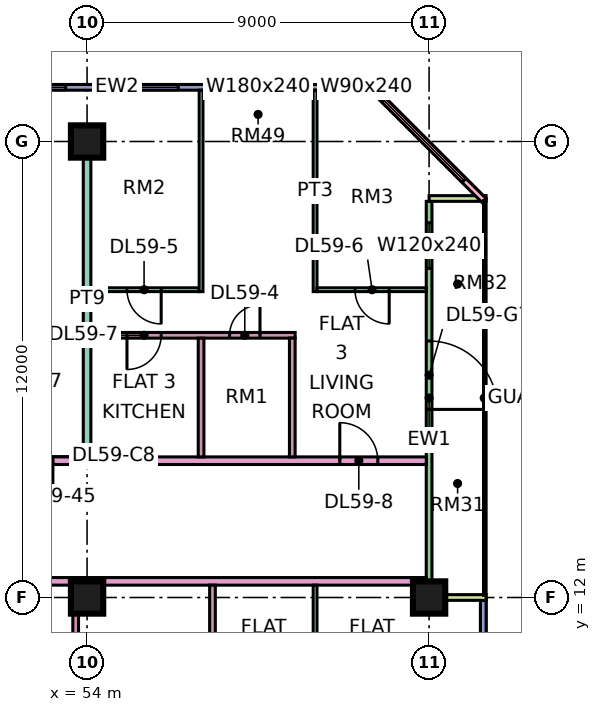
"""IFC4 building model, lengths in metres.
Left out: names, types, materials, properties, quantities, classifications, styles, units other than length and angle.
Written with IfcOpenShell. Run it as: python <this file> out.ifc"""

import sys

from ifc_helpers import new_model, si_unit, direction, frame, frame_2d, origin, origin_2d, place, context, subcontext, project, spatial, rectangle, extrude, element, fill, save


model = new_model("IFC4")
c1 = context("Model", 3, precision=1e-05, world=origin(), true_north=direction((0.0, 1.0)))
c2 = subcontext(c1, "Body", "Model", "MODEL_VIEW")
j1 = project(units=[si_unit("LENGTHUNIT", "METRE"), si_unit("PLANEANGLEUNIT", "RADIAN")], contexts=[c1])
p1 = place(None, origin())
s1 = spatial("IfcSite", under=j1, at=p1, CompositionType="ELEMENT")
p2 = place(p1, origin())
s2 = spatial("IfcBuilding", under=s1, at=p2, CompositionType="ELEMENT")
p3 = place(p2, frame((0.0, 0.0, 249.15)))
s3 = spatial("IfcBuildingStorey", under=s2, at=p3, CompositionType="ELEMENT", Elevation=249.15)
for number, where, z_axis, x_axis in (
    (1, (54.0, 12.0, 0.0), (0.0, 0.0, 1.0), (1.0, 0.0, 0.0)),
    (2, (54.0, 24.0, 0.0), (0.0, 0.0, 1.0), (1.0, 0.0, 0.0)),
    (3, (63.0, 12.0, 0.0), (0.0, 0.0, 1.0), (1.0, 0.0, 0.0)),
):
    element("IfcColumn", number, at=place(p3, frame(where, z_axis=z_axis, x_axis=x_axis)), inside=s3, PredefinedType="COLUMN", context=c2, shape_type="SweptSolid", body=[
        extrude(rectangle(XDim=0.85, YDim=0.85, at=origin_2d()), origin(), (0.0, 0.0, 1.0), 3.75),
    ])
p4 = place(p3, frame((61.5, 25.425, 0.0), z_axis=(0.0, 0.0, 1.0), x_axis=(-1.0, 0.0, 0.0)))
e4 = element("IfcWall", 4, at=p4, inside=s3, PredefinedType="SOLIDWALL", context=c2, shape_type="SweptSolid", body=[
    extrude(rectangle(XDim=13.425, YDim=0.15, at=frame_2d((6.712, 0.0))), origin(), (0.0, 0.0, 1.0), 3.35),
])
p5 = place(p4, frame((0.3, 0.0, 0.45)))
e5 = element("IfcOpeningElement", 5, at=p5, cuts=e4, PredefinedType="OPENING", context=c2, shape_type="SweptSolid", body=[
    extrude(rectangle(XDim=0.9, YDim=2.4, at=frame_2d((0.45, 1.2))), frame((0.0, 0.085, 0.0), z_axis=(0.0, -1.0, 0.0), x_axis=(1.0, 0.0, 0.0)), (0.0, 0.0, 1.0), 0.17),
])
p6 = place(p4, frame((2.1, 0.0, 0.45)))
e6 = element("IfcOpeningElement", 6, at=p6, cuts=e4, PredefinedType="OPENING", context=c2, shape_type="SweptSolid", body=[
    extrude(rectangle(XDim=1.8, YDim=2.4, at=frame_2d((0.9, 1.2))), frame((0.0, 0.085, 0.0), z_axis=(0.0, -1.0, 0.0), x_axis=(1.0, 0.0, 0.0)), (0.0, 0.0, 1.0), 0.17),
])
p7 = place(p4, frame((5.1, 0.0, 0.45)))
e7 = element("IfcOpeningElement", 7, at=p7, cuts=e4, PredefinedType="OPENING", context=c2, shape_type="SweptSolid", body=[
    extrude(rectangle(XDim=1.8, YDim=2.4, at=frame_2d((0.9, 1.2))), frame((0.0, 0.085, 0.0), z_axis=(0.0, -1.0, 0.0), x_axis=(1.0, 0.0, 0.0)), (0.0, 0.0, 1.0), 0.17),
])
p8 = place(p4, frame((8.062, 0.0, 0.45)))
e8 = element("IfcOpeningElement", 8, at=p8, cuts=e4, PredefinedType="OPENING", context=c2, shape_type="SweptSolid", body=[
    extrude(rectangle(XDim=4.8, YDim=2.4, at=frame_2d((2.4, 1.2))), frame((0.0, 0.085, 0.0), z_axis=(0.0, -1.0, 0.0), x_axis=(1.0, 0.0, 0.0)), (0.0, 0.0, 1.0), 0.17),
])
p9 = place(p3, frame((64.425, 1.5, 0.0), z_axis=(0.0, 0.0, 1.0), x_axis=(0.0, 1.0, 0.0)))
e9 = element("IfcWall", 9, at=p9, inside=s3, PredefinedType="SOLIDWALL", context=c2, shape_type="SweptSolid", body=[
    extrude(rectangle(XDim=10.425, YDim=0.15, at=frame_2d((5.212, 0.0))), origin(), (0.0, 0.0, 1.0), 3.35),
])
p10 = place(p9, frame((0.663, 0.0, 0.45)))
e10 = element("IfcOpeningElement", 10, at=p10, cuts=e9, PredefinedType="OPENING", context=c2, shape_type="SweptSolid", body=[
    extrude(rectangle(XDim=4.8, YDim=2.4, at=frame_2d((2.4, 1.2))), frame((0.0, 0.085, 0.0), z_axis=(0.0, -1.0, 0.0), x_axis=(1.0, 0.0, 0.0)), (0.0, 0.0, 1.0), 0.17),
])
p11 = place(p3, frame((63.0, 12.075, 0.0), z_axis=(0.0, 0.0, 1.0), x_axis=(0.0, 1.0, 0.0)))
e11 = element("IfcWall", 11, at=p11, inside=s3, PredefinedType="SOLIDWALL", context=c2, shape_type="SweptSolid", body=[
    extrude(rectangle(XDim=10.35, YDim=0.15, at=frame_2d((5.175, 0.0))), origin(), (0.0, 0.0, 1.0), 3.35),
])
p12 = place(p11, frame((4.875, 0.0, 0.0)))
e12 = element("IfcOpeningElement", 12, at=p12, cuts=e11, PredefinedType="OPENING", context=c2, shape_type="SweptSolid", body=[
    extrude(rectangle(XDim=1.8, YDim=2.4, at=frame_2d((0.9, 1.2))), frame((0.0, 0.085, 0.0), z_axis=(0.0, -1.0, 0.0), x_axis=(1.0, 0.0, 0.0)), (0.0, 0.0, 1.0), 0.17),
])
p13 = place(p11, frame((8.587, 0.0, 0.45)))
e13 = element("IfcOpeningElement", 13, at=p13, cuts=e11, PredefinedType="OPENING", context=c2, shape_type="SweptSolid", body=[
    extrude(rectangle(XDim=1.2, YDim=2.4, at=frame_2d((0.6, 1.2))), frame((0.0, 0.085, 0.0), z_axis=(0.0, -1.0, 0.0), x_axis=(1.0, 0.0, 0.0)), (0.0, 0.0, 1.0), 0.17),
])
for number, where, z_axis, x_axis in (
    (14, (64.5, 12.0, 0.0), (0.0, 0.0, 1.0), (-1.0, 0.0, 0.0)),
    (15, (64.5, 22.5, 0.0), (0.0, 0.0, 1.0), (-1.0, 0.0, 0.0)),
):
    element("IfcWall", number, at=place(p3, frame(where, z_axis=z_axis, x_axis=x_axis)), inside=s3, PredefinedType="SOLIDWALL", context=c2, shape_type="SweptSolid", body=[
        extrude(rectangle(XDim=1.5, YDim=0.15, at=frame_2d((0.75, 0.0))), origin(), (0.0, 0.0, 1.0), 3.35),
    ])
p14 = place(p3, frame((64.447, 22.447, 0.0), z_axis=(0.0, 0.0, 1.0), x_axis=(-0.707106781187, 0.707106781187, 0.0)))
e16 = element("IfcWall", 16, at=p14, inside=s3, PredefinedType="SOLIDWALL", context=c2, shape_type="SweptSolid", body=[
    extrude(rectangle(XDim=4.243, YDim=0.15, at=frame_2d((2.121, 0.0))), origin(), (0.0, 0.0, 1.0), 3.35),
])
p15 = place(p14, frame((0.744, 0.0, 0.45)))
e17 = element("IfcOpeningElement", 17, at=p15, cuts=e16, PredefinedType="OPENING", context=c2, shape_type="SweptSolid", body=[
    extrude(rectangle(XDim=3.0, YDim=2.4, at=frame_2d((1.5, 1.2))), frame((0.0, 0.085, 0.0), z_axis=(0.0, -1.0, 0.0), x_axis=(1.0, 0.0, 0.0)), (0.0, 0.0, 1.0), 0.17),
])
p16 = place(p3, frame((40.65, 12.425, 0.0), z_axis=(0.0, 0.0, 1.0), x_axis=(1.0, 0.0, 0.0)))
e18 = element("IfcWall", 18, at=p16, inside=s3, PredefinedType="PARTITIONING", context=c2, shape_type="SweptSolid", body=[
    extrude(rectangle(XDim=22.276, YDim=0.2, at=frame_2d((11.138, 0.0))), origin(), (0.0, 0.0, 1.0), 3.35),
])
p17 = place(p16, frame((8.7, 0.0, 0.0)))
e19 = element("IfcOpeningElement", 19, at=p17, cuts=e18, PredefinedType="OPENING", context=c2, shape_type="SweptSolid", body=[
    extrude(rectangle(XDim=1.0, YDim=2.1, at=frame_2d((0.5, 1.05))), frame((0.0, 0.11, 0.0), z_axis=(0.0, -1.0, 0.0), x_axis=(1.0, 0.0, 0.0)), (0.0, 0.0, 1.0), 0.22),
])
p18 = place(p16, frame((1.05, 0.0, 0.0)))
e20 = element("IfcOpeningElement", 20, at=p18, cuts=e18, PredefinedType="OPENING", context=c2, shape_type="SweptSolid", body=[
    extrude(rectangle(XDim=1.0, YDim=2.1, at=frame_2d((0.5, 1.05))), frame((0.0, 0.11, 0.0), z_axis=(0.0, -1.0, 0.0), x_axis=(1.0, 0.0, 0.0)), (0.0, 0.0, 1.0), 0.22),
])
p19 = place(p3, frame((51.225, 15.6, 0.0), z_axis=(0.0, 0.0, 1.0), x_axis=(1.0, 0.0, 0.0)))
e21 = element("IfcWall", 21, at=p19, inside=s3, PredefinedType="PARTITIONING", context=c2, shape_type="SweptSolid", body=[
    extrude(rectangle(XDim=11.701, YDim=0.2, at=frame_2d((5.851, 0.0))), origin(), (0.0, 0.0, 1.0), 3.35),
])
p20 = place(p19, frame((9.425, 0.0, 0.0)))
e22 = element("IfcOpeningElement", 22, at=p20, cuts=e21, PredefinedType="OPENING", context=c2, shape_type="SweptSolid", body=[
    extrude(rectangle(XDim=1.0, YDim=2.1, at=frame_2d((0.5, 1.05))), frame((0.0, 0.11, 0.0), z_axis=(0.0, -1.0, 0.0), x_axis=(1.0, 0.0, 0.0)), (0.0, 0.0, 1.0), 0.22),
])
p21 = place(p19, frame((0.875, 0.0, 0.0)))
e23 = element("IfcOpeningElement", 23, at=p21, cuts=e21, PredefinedType="OPENING", context=c2, shape_type="SweptSolid", body=[
    extrude(rectangle(XDim=1.0, YDim=2.1, at=frame_2d((0.5, 1.05))), frame((0.0, 0.11, 0.0), z_axis=(0.0, -1.0, 0.0), x_axis=(1.0, 0.0, 0.0)), (0.0, 0.0, 1.0), 0.22),
])
p22 = place(p3, frame((53.7, 7.7, 0.0), z_axis=(0.0, 0.0, 1.0), x_axis=(0.0, 1.0, 0.0)))
e24 = element("IfcWall", 24, at=p22, inside=s3, PredefinedType="PARTITIONING", context=c2, shape_type="SweptSolid", body=[
    extrude(rectangle(XDim=4.625, YDim=0.15, at=frame_2d((2.312, 0.0))), origin(), (0.0, 0.0, 1.0), 3.35),
])
p23 = place(p3, frame((54.0, 15.7, 0.0), z_axis=(0.0, 0.0, 1.0), x_axis=(0.0, 1.0, 0.0)))
e25 = element("IfcWall", 25, at=p23, inside=s3, PredefinedType="PARTITIONING", context=c2, shape_type="SweptSolid", body=[
    extrude(rectangle(XDim=8.3, YDim=0.2, at=frame_2d((4.15, 0.0))), origin(), (0.0, 0.0, 1.0), 3.35),
])
p24 = place(p3, frame((54.1, 18.9, 0.0), z_axis=(0.0, 0.0, 1.0), x_axis=(1.0, 0.0, 0.0)))
e26 = element("IfcWall", 26, at=p24, inside=s3, PredefinedType="PARTITIONING", context=c2, shape_type="SweptSolid", body=[
    extrude(rectangle(XDim=5.375, YDim=0.15, at=frame_2d((2.688, 0.0))), origin(), (0.0, 0.0, 1.0), 3.35),
])
p25 = place(p24, frame((3.65, 0.0, 0.0)))
e27 = element("IfcOpeningElement", 27, at=p25, cuts=e26, PredefinedType="OPENING", context=c2, shape_type="SweptSolid", body=[
    extrude(rectangle(XDim=0.8, YDim=2.1, at=frame_2d((0.4, 1.05))), frame((0.0, 0.085, 0.0), z_axis=(0.0, -1.0, 0.0), x_axis=(1.0, 0.0, 0.0)), (0.0, 0.0, 1.0), 0.17),
])
p26 = place(p24, frame((0.95, 0.0, 0.0)))
e28 = element("IfcOpeningElement", 28, at=p26, cuts=e26, PredefinedType="OPENING", context=c2, shape_type="SweptSolid", body=[
    extrude(rectangle(XDim=0.9, YDim=2.1, at=frame_2d((0.45, 1.05))), frame((0.0, 0.085, 0.0), z_axis=(0.0, -1.0, 0.0), x_axis=(1.0, 0.0, 0.0)), (0.0, 0.0, 1.0), 0.17),
])
p27 = place(p3, frame((54.1, 20.1, 0.0), z_axis=(0.0, 0.0, 1.0), x_axis=(1.0, 0.0, 0.0)))
e29 = element("IfcWall", 29, at=p27, inside=s3, PredefinedType="PARTITIONING", context=c2, shape_type="SweptSolid", body=[
    extrude(rectangle(XDim=2.85, YDim=0.1, at=frame_2d((1.425, 0.0))), origin(), (0.0, 0.0, 1.0), 3.35),
])
p28 = place(p27, frame((0.95, 0.0, 0.0)))
e30 = element("IfcOpeningElement", 30, at=p28, cuts=e29, PredefinedType="OPENING", context=c2, shape_type="SweptSolid", body=[
    extrude(rectangle(XDim=0.9, YDim=2.1, at=frame_2d((0.45, 1.05))), frame((0.0, 0.06, 0.0), z_axis=(0.0, -1.0, 0.0), x_axis=(1.0, 0.0, 0.0)), (0.0, 0.0, 1.0), 0.12),
])
p29 = place(p3, frame((57.0, 15.7, 0.0), z_axis=(0.0, 0.0, 1.0), x_axis=(0.0, 1.0, 0.0)))
e31 = element("IfcWall", 31, at=p29, inside=s3, PredefinedType="PARTITIONING", context=c2, shape_type="SweptSolid", body=[
    extrude(rectangle(XDim=3.125, YDim=0.15, at=frame_2d((1.562, 0.0))), origin(), (0.0, 0.0, 1.0), 3.35),
])
p30 = place(p3, frame((57.0, 20.05, 0.0), z_axis=(0.0, 0.0, 1.0), x_axis=(0.0, 1.0, 0.0)))
e32 = element("IfcWall", 32, at=p30, inside=s3, PredefinedType="PARTITIONING", context=c2, shape_type="SweptSolid", body=[
    extrude(rectangle(XDim=5.3, YDim=0.1, at=frame_2d((2.65, 0.0))), origin(), (0.0, 0.0, 1.0), 3.35),
])
p31 = place(p3, frame((57.3, 7.7, 0.0), z_axis=(0.0, 0.0, 1.0), x_axis=(0.0, 1.0, 0.0)))
e33 = element("IfcWall", 33, at=p31, inside=s3, PredefinedType="PARTITIONING", context=c2, shape_type="SweptSolid", body=[
    extrude(rectangle(XDim=4.625, YDim=0.15, at=frame_2d((2.312, 0.0))), origin(), (0.0, 0.0, 1.0), 3.35),
])
p32 = place(p3, frame((59.4, 15.7, 0.0), z_axis=(0.0, 0.0, 1.0), x_axis=(0.0, 1.0, 0.0)))
e34 = element("IfcWall", 34, at=p32, inside=s3, PredefinedType="PARTITIONING", context=c2, shape_type="SweptSolid", body=[
    extrude(rectangle(XDim=3.125, YDim=0.15, at=frame_2d((1.562, 0.0))), origin(), (0.0, 0.0, 1.0), 3.35),
])
p33 = place(p3, frame((60.0, 7.7, 0.0), z_axis=(0.0, 0.0, 1.0), x_axis=(0.0, 1.0, 0.0)))
e35 = element("IfcWall", 35, at=p33, inside=s3, PredefinedType="PARTITIONING", context=c2, shape_type="SweptSolid", body=[
    extrude(rectangle(XDim=4.625, YDim=0.1, at=frame_2d((2.312, 0.0))), origin(), (0.0, 0.0, 1.0), 3.35),
])
p34 = place(p3, frame((60.0, 20.05, 0.0), z_axis=(0.0, 0.0, 1.0), x_axis=(0.0, 1.0, 0.0)))
e36 = element("IfcWall", 36, at=p34, inside=s3, PredefinedType="PARTITIONING", context=c2, shape_type="SweptSolid", body=[
    extrude(rectangle(XDim=5.3, YDim=0.1, at=frame_2d((2.65, 0.0))), origin(), (0.0, 0.0, 1.0), 3.35),
])
p35 = place(p3, frame((60.05, 20.1, 0.0), z_axis=(0.0, 0.0, 1.0), x_axis=(1.0, 0.0, 0.0)))
e37 = element("IfcWall", 37, at=p35, inside=s3, PredefinedType="PARTITIONING", context=c2, shape_type="SweptSolid", body=[
    extrude(rectangle(XDim=2.876, YDim=0.1, at=frame_2d((1.438, 0.0))), origin(), (0.0, 0.0, 1.0), 3.35),
])
p36 = place(p35, frame((1.0, 0.0, 0.0)))
e38 = element("IfcOpeningElement", 38, at=p36, cuts=e37, PredefinedType="OPENING", context=c2, shape_type="SweptSolid", body=[
    extrude(rectangle(XDim=0.9, YDim=2.1, at=frame_2d((0.45, 1.05))), frame((0.0, 0.06, 0.0), z_axis=(0.0, -1.0, 0.0), x_axis=(1.0, 0.0, 0.0)), (0.0, 0.0, 1.0), 0.12),
])
p37 = place(p5, origin())
e39 = element("IfcWindow", 39, at=p37, inside=s3, PartitioningType="SINGLE_PANEL", PredefinedType="WINDOW", context=c2, shape_type="SweptSolid", body=[
    extrude(rectangle(XDim=0.9, YDim=2.4, at=frame_2d((0.45, 1.2))), frame((0.0, 0.03, 0.0), z_axis=(0.0, -1.0, 0.0), x_axis=(1.0, 0.0, 0.0)), (0.0, 0.0, 1.0), 0.06),
])
fill(e5, e39)
p38 = place(p6, origin())
e40 = element("IfcWindow", 40, at=p38, inside=s3, PartitioningType="SINGLE_PANEL", PredefinedType="WINDOW", context=c2, shape_type="SweptSolid", body=[
    extrude(rectangle(XDim=1.8, YDim=2.4, at=frame_2d((0.9, 1.2))), frame((0.0, 0.03, 0.0), z_axis=(0.0, -1.0, 0.0), x_axis=(1.0, 0.0, 0.0)), (0.0, 0.0, 1.0), 0.06),
])
fill(e6, e40)
p39 = place(p7, origin())
e41 = element("IfcWindow", 41, at=p39, inside=s3, PartitioningType="SINGLE_PANEL", PredefinedType="WINDOW", context=c2, shape_type="SweptSolid", body=[
    extrude(rectangle(XDim=1.8, YDim=2.4, at=frame_2d((0.9, 1.2))), frame((0.0, 0.03, 0.0), z_axis=(0.0, -1.0, 0.0), x_axis=(1.0, 0.0, 0.0)), (0.0, 0.0, 1.0), 0.06),
])
fill(e7, e41)
p40 = place(p8, origin())
e42 = element("IfcWindow", 42, at=p40, inside=s3, PartitioningType="SINGLE_PANEL", PredefinedType="WINDOW", context=c2, shape_type="SweptSolid", body=[
    extrude(rectangle(XDim=4.8, YDim=2.4, at=frame_2d((2.4, 1.2))), frame((0.0, 0.03, 0.0), z_axis=(0.0, -1.0, 0.0), x_axis=(1.0, 0.0, 0.0)), (0.0, 0.0, 1.0), 0.06),
])
fill(e8, e42)
p41 = place(p12, frame((1.8, 0.0, 0.0), z_axis=(0.0, 0.0, 1.0), x_axis=(-1.0, 0.0, 0.0)))
e43 = element("IfcDoor", 43, at=p41, inside=s3, OperationType="DOUBLE_DOOR_SINGLE_SWING", PredefinedType="DOOR", context=c2, shape_type="SweptSolid", body=[
    extrude(rectangle(XDim=1.8, YDim=2.4, at=frame_2d((0.9, 1.2))), frame((0.0, 0.025, 0.0), z_axis=(0.0, -1.0, 0.0), x_axis=(1.0, 0.0, 0.0)), (0.0, 0.0, 1.0), 0.05),
])
fill(e12, e43)
p42 = place(p13, origin())
e44 = element("IfcWindow", 44, at=p42, inside=s3, PartitioningType="SINGLE_PANEL", PredefinedType="WINDOW", context=c2, shape_type="SweptSolid", body=[
    extrude(rectangle(XDim=1.2, YDim=2.4, at=frame_2d((0.6, 1.2))), frame((0.0, 0.03, 0.0), z_axis=(0.0, -1.0, 0.0), x_axis=(1.0, 0.0, 0.0)), (0.0, 0.0, 1.0), 0.06),
])
fill(e13, e44)
p43 = place(p15, origin())
e45 = element("IfcWindow", 45, at=p43, inside=s3, PartitioningType="SINGLE_PANEL", PredefinedType="WINDOW", context=c2, shape_type="SweptSolid", body=[
    extrude(rectangle(XDim=3.0, YDim=2.4, at=frame_2d((1.5, 1.2))), frame((0.0, 0.03, 0.0), z_axis=(0.0, -1.0, 0.0), x_axis=(1.0, 0.0, 0.0)), (0.0, 0.0, 1.0), 0.06),
])
fill(e17, e45)
p44 = place(p25, frame((0.8, 0.0, 0.0), z_axis=(0.0, 0.0, 1.0), x_axis=(-1.0, 0.0, 0.0)))
e46 = element("IfcDoor", 46, at=p44, inside=s3, OperationType="SINGLE_SWING_RIGHT", PredefinedType="DOOR", context=c2, shape_type="SweptSolid", body=[
    extrude(rectangle(XDim=0.8, YDim=2.1, at=frame_2d((0.4, 1.05))), frame((0.0, 0.025, 0.0), z_axis=(0.0, -1.0, 0.0), x_axis=(1.0, 0.0, 0.0)), (0.0, 0.0, 1.0), 0.05),
])
fill(e27, e46)
p45 = place(p28, origin())
e47 = element("IfcDoor", 47, at=p45, inside=s3, OperationType="SINGLE_SWING_RIGHT", PredefinedType="DOOR", context=c2, shape_type="SweptSolid", body=[
    extrude(rectangle(XDim=0.9, YDim=2.1, at=frame_2d((0.45, 1.05))), frame((0.0, 0.025, 0.0), z_axis=(0.0, -1.0, 0.0), x_axis=(1.0, 0.0, 0.0)), (0.0, 0.0, 1.0), 0.05),
])
fill(e30, e47)
p46 = place(p36, origin())
e48 = element("IfcDoor", 48, at=p46, inside=s3, OperationType="SINGLE_SWING_RIGHT", PredefinedType="DOOR", context=c2, shape_type="SweptSolid", body=[
    extrude(rectangle(XDim=0.9, YDim=2.1, at=frame_2d((0.45, 1.05))), frame((0.0, 0.025, 0.0), z_axis=(0.0, -1.0, 0.0), x_axis=(1.0, 0.0, 0.0)), (0.0, 0.0, 1.0), 0.05),
])
fill(e38, e48)
p47 = place(p26, frame((0.9, 0.0, 0.0), z_axis=(0.0, 0.0, 1.0), x_axis=(-1.0, 0.0, 0.0)))
e49 = element("IfcDoor", 49, at=p47, inside=s3, OperationType="SINGLE_SWING_LEFT", PredefinedType="DOOR", context=c2, shape_type="SweptSolid", body=[
    extrude(rectangle(XDim=0.9, YDim=2.1, at=frame_2d((0.45, 1.05))), frame((0.0, 0.025, 0.0), z_axis=(0.0, -1.0, 0.0), x_axis=(1.0, 0.0, 0.0)), (0.0, 0.0, 1.0), 0.05),
])
fill(e28, e49)
p48 = place(p20, origin())
e50 = element("IfcDoor", 50, at=p48, inside=s3, OperationType="SINGLE_SWING_LEFT", PredefinedType="DOOR", context=c2, shape_type="SweptSolid", body=[
    extrude(rectangle(XDim=1.0, YDim=2.1, at=frame_2d((0.5, 1.05))), frame((0.0, 0.025, 0.0), z_axis=(0.0, -1.0, 0.0), x_axis=(1.0, 0.0, 0.0)), (0.0, 0.0, 1.0), 0.05),
])
fill(e22, e50)
p49 = place(p21, origin())
e51 = element("IfcDoor", 51, at=p49, inside=s3, OperationType="SINGLE_SWING_RIGHT", PredefinedType="DOOR", context=c2, shape_type="SweptSolid", body=[
    extrude(rectangle(XDim=1.0, YDim=2.1, at=frame_2d((0.5, 1.05))), frame((0.0, 0.025, 0.0), z_axis=(0.0, -1.0, 0.0), x_axis=(1.0, 0.0, 0.0)), (0.0, 0.0, 1.0), 0.05),
])
fill(e23, e51)
save(model, sys.argv[1])
